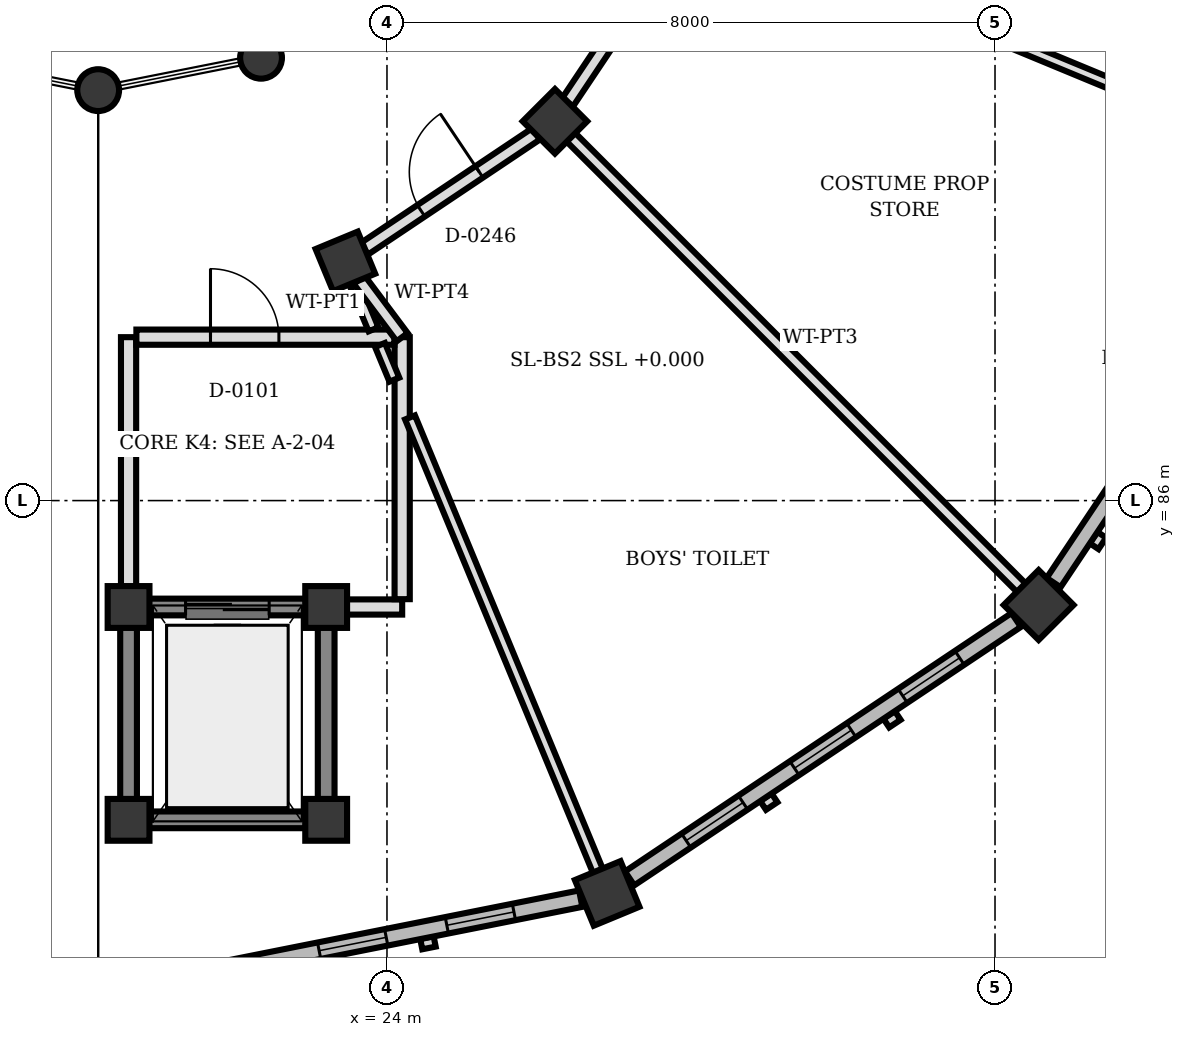
"""IFC4 building model, lengths in metres.
Left out: names, types, materials, properties, quantities, classifications, styles, units other than length and angle.
Written with IfcOpenShell. Run it as: python <this file> out.ifc"""

import sys

from ifc_helpers import new_model, si_unit, direction, frame, frame_2d, origin, origin_2d, place, context, subcontext, project, spatial, rectangle, circle, extrude, element, fill, save


model = new_model("IFC4")
c1 = context("Model", 3, precision=1e-05, world=origin(), true_north=direction((0.0, 1.0)))
c2 = subcontext(c1, "Body", "Model", "MODEL_VIEW")
j1 = project(units=[si_unit("LENGTHUNIT", "METRE"), si_unit("PLANEANGLEUNIT", "RADIAN")], contexts=[c1])
p1 = place(None, origin())
s1 = spatial("IfcSite", under=j1, at=p1, CompositionType="ELEMENT")
p2 = place(p1, origin())
s2 = spatial("IfcBuilding", under=s1, at=p2, CompositionType="ELEMENT")
p3 = place(p2, origin())
s3 = spatial("IfcBuildingStorey", under=s2, at=p3, CompositionType="ELEMENT", Elevation=0.0)
for number, where, z_axis, x_axis in (
    (1, (20.6, 81.8, 0.0), (0.0, 0.0, 1.0), (1.0, 0.0, 0.0)),
    (2, (23.2, 81.8, 0.0), (0.0, 0.0, 1.0), (1.0, 0.0, 0.0)),
    (3, (23.2, 84.6, 0.0), (0.0, 0.0, 1.0), (1.0, 0.0, 0.0)),
    (4, (20.6, 84.6, 0.0), (0.0, 0.0, 1.0), (1.0, 0.0, 0.0)),
):
    element("IfcColumn", number, at=place(p3, frame(where, z_axis=z_axis, x_axis=x_axis)), inside=s3, PredefinedType="COLUMN", context=c2, shape_type="SweptSolid", body=[
        extrude(rectangle(XDim=0.55, YDim=0.55, at=origin_2d()), origin(), (0.0, 0.0, 1.0), 4.5),
    ])
for number, where, z_axis, x_axis in (
    (5, (20.2, 91.4, 0.0), (0.0, 0.0, 1.0), (1.0, 0.0, 0.0)),
    (6, (22.343, 91.826, 0.0), (0.0, 0.0, 1.0), (1.0, 0.0, 0.0)),
):
    element("IfcColumn", number, at=place(p3, frame(where, z_axis=z_axis, x_axis=x_axis)), inside=s3, PredefinedType="COLUMN", context=c2, shape_type="SweptSolid", body=[
        extrude(circle(Radius=0.275, at=origin_2d()), origin(), (0.0, 0.0, 1.0), 4.5),
    ])
for number, where, z_axis, x_axis in (
    (7, (23.453, 89.147, 0.0), (0.0, 0.0, 1.0), (0.383, -0.924, 0.0)),
    (8, (26.21, 90.99, 0.0), (0.0, 0.0, 1.0), (0.707, -0.707, 0.0)),
):
    element("IfcColumn", number, at=place(p3, frame(where, z_axis=z_axis, x_axis=x_axis)), inside=s3, PredefinedType="COLUMN", context=c2, shape_type="SweptSolid", body=[
        extrude(rectangle(XDim=0.6, YDim=0.6, at=origin_2d()), origin(), (0.0, 0.0, 1.0), 4.5),
    ])
for number, where, z_axis, x_axis in (
    (9, (26.897, 80.832, 0.0), (0.0, 0.0, 1.0), (0.383, -0.924, 0.0)),
    (10, (32.574, 84.626, 0.0), (0.0, 0.0, 1.0), (0.707, -0.707, 0.0)),
):
    element("IfcColumn", number, at=place(p3, frame(where, z_axis=z_axis, x_axis=x_axis)), inside=s3, PredefinedType="COLUMN", context=c2, shape_type="SweptSolid", body=[
        extrude(rectangle(XDim=0.65, YDim=0.65, at=origin_2d()), origin(), (0.0, 0.0, 1.0), 4.5),
    ])
p4 = place(p3, frame((19.852, 79.569, 0.0), z_axis=(0.0, 0.0, 1.0), x_axis=(-0.98077967596, 0.19511849534, 0.0)))
e11 = element("IfcWall", 11, at=p4, inside=s3, PredefinedType="SOLIDWALL", context=c2, shape_type="SweptSolid", body=[
    extrude(rectangle(XDim=6.119, YDim=0.22, at=frame_2d((3.059, 0.0))), origin(), (0.0, 0.0, 1.0), 3.55),
])
p5 = place(p4, frame((0.896, 0.0, 0.85)))
e12 = element("IfcOpeningElement", 12, at=p5, cuts=e11, PredefinedType="OPENING", context=c2, shape_type="SweptSolid", body=[
    extrude(rectangle(XDim=0.9, YDim=1.4, at=frame_2d((0.45, 0.7))), frame((0.0, 0.12, 0.0), z_axis=(0.0, -1.0, 0.0), x_axis=(1.0, 0.0, 0.0)), (0.0, 0.0, 1.0), 0.24),
])
p6 = place(p4, frame((2.609, 0.0, 0.85)))
e13 = element("IfcOpeningElement", 13, at=p6, cuts=e11, PredefinedType="OPENING", context=c2, shape_type="SweptSolid", body=[
    extrude(rectangle(XDim=0.9, YDim=1.4, at=frame_2d((0.45, 0.7))), frame((0.0, 0.12, 0.0), z_axis=(0.0, -1.0, 0.0), x_axis=(1.0, 0.0, 0.0)), (0.0, 0.0, 1.0), 0.24),
])
p7 = place(p4, frame((4.323, 0.0, 0.85)))
e14 = element("IfcOpeningElement", 14, at=p7, cuts=e11, PredefinedType="OPENING", context=c2, shape_type="SweptSolid", body=[
    extrude(rectangle(XDim=0.9, YDim=1.4, at=frame_2d((0.45, 0.7))), frame((0.0, 0.12, 0.0), z_axis=(0.0, -1.0, 0.0), x_axis=(1.0, 0.0, 0.0)), (0.0, 0.0, 1.0), 0.24),
])
p8 = place(p3, frame((26.549, 80.763, 0.0), z_axis=(0.0, 0.0, 1.0), x_axis=(-0.98077967596, -0.19511849534, 0.0)))
e15 = element("IfcWall", 15, at=p8, inside=s3, PredefinedType="SOLIDWALL", context=c2, shape_type="SweptSolid", body=[
    extrude(rectangle(XDim=6.119, YDim=0.22, at=frame_2d((3.059, 0.0))), origin(), (0.0, 0.0, 1.0), 3.55),
])
p9 = place(p8, frame((0.896, 0.0, 0.85)))
e16 = element("IfcOpeningElement", 16, at=p9, cuts=e15, PredefinedType="OPENING", context=c2, shape_type="SweptSolid", body=[
    extrude(rectangle(XDim=0.9, YDim=1.4, at=frame_2d((0.45, 0.7))), frame((0.0, 0.12, 0.0), z_axis=(0.0, -1.0, 0.0), x_axis=(1.0, 0.0, 0.0)), (0.0, 0.0, 1.0), 0.24),
])
p10 = place(p8, frame((2.609, 0.0, 0.85)))
e17 = element("IfcOpeningElement", 17, at=p10, cuts=e15, PredefinedType="OPENING", context=c2, shape_type="SweptSolid", body=[
    extrude(rectangle(XDim=0.9, YDim=1.4, at=frame_2d((0.45, 0.7))), frame((0.0, 0.12, 0.0), z_axis=(0.0, -1.0, 0.0), x_axis=(1.0, 0.0, 0.0)), (0.0, 0.0, 1.0), 0.24),
])
p11 = place(p8, frame((4.323, 0.0, 0.85)))
e18 = element("IfcOpeningElement", 18, at=p11, cuts=e15, PredefinedType="OPENING", context=c2, shape_type="SweptSolid", body=[
    extrude(rectangle(XDim=0.9, YDim=1.4, at=frame_2d((0.45, 0.7))), frame((0.0, 0.12, 0.0), z_axis=(0.0, -1.0, 0.0), x_axis=(1.0, 0.0, 0.0)), (0.0, 0.0, 1.0), 0.24),
])
p12 = place(p3, frame((32.279, 84.429, 0.0), z_axis=(0.0, 0.0, 1.0), x_axis=(-0.831411331728, -0.555657446161, 0.0)))
e19 = element("IfcWall", 19, at=p12, inside=s3, PredefinedType="SOLIDWALL", context=c2, shape_type="SweptSolid", body=[
    extrude(rectangle(XDim=6.119, YDim=0.22, at=frame_2d((3.059, 0.0))), origin(), (0.0, 0.0, 1.0), 3.55),
])
p13 = place(p12, frame((0.896, 0.0, 0.85)))
e20 = element("IfcOpeningElement", 20, at=p13, cuts=e19, PredefinedType="OPENING", context=c2, shape_type="SweptSolid", body=[
    extrude(rectangle(XDim=0.9, YDim=1.4, at=frame_2d((0.45, 0.7))), frame((0.0, 0.12, 0.0), z_axis=(0.0, -1.0, 0.0), x_axis=(1.0, 0.0, 0.0)), (0.0, 0.0, 1.0), 0.24),
])
p14 = place(p12, frame((2.609, 0.0, 0.85)))
e21 = element("IfcOpeningElement", 21, at=p14, cuts=e19, PredefinedType="OPENING", context=c2, shape_type="SweptSolid", body=[
    extrude(rectangle(XDim=0.9, YDim=1.4, at=frame_2d((0.45, 0.7))), frame((0.0, 0.12, 0.0), z_axis=(0.0, -1.0, 0.0), x_axis=(1.0, 0.0, 0.0)), (0.0, 0.0, 1.0), 0.24),
])
p15 = place(p12, frame((4.323, 0.0, 0.85)))
e22 = element("IfcOpeningElement", 22, at=p15, cuts=e19, PredefinedType="OPENING", context=c2, shape_type="SweptSolid", body=[
    extrude(rectangle(XDim=0.9, YDim=1.4, at=frame_2d((0.45, 0.7))), frame((0.0, 0.12, 0.0), z_axis=(0.0, -1.0, 0.0), x_axis=(1.0, 0.0, 0.0)), (0.0, 0.0, 1.0), 0.24),
])
p16 = place(p3, frame((36.171, 90.008, 0.0), z_axis=(0.0, 0.0, 1.0), x_axis=(-0.555657446161, -0.831411331728, 0.0)))
e23 = element("IfcWall", 23, at=p16, inside=s3, PredefinedType="SOLIDWALL", context=c2, shape_type="SweptSolid", body=[
    extrude(rectangle(XDim=6.119, YDim=0.22, at=frame_2d((3.059, 0.0))), origin(), (0.0, 0.0, 1.0), 3.55),
])
p17 = place(p16, frame((2.284, 0.0, 0.0)))
e24 = element("IfcOpeningElement", 24, at=p17, cuts=e23, PredefinedType="OPENING", context=c2, shape_type="SweptSolid", body=[
    extrude(rectangle(XDim=1.55, YDim=2.2, at=frame_2d((0.775, 1.1))), frame((0.0, 0.12, 0.0), z_axis=(0.0, -1.0, 0.0), x_axis=(1.0, 0.0, 0.0)), (0.0, 0.0, 1.0), 0.24),
])
p18 = place(p3, frame((20.867, 81.8, 0.0), z_axis=(0.0, 0.0, 1.0), x_axis=(1.0, 0.0, 0.0)))
e25 = element("IfcWall", 25, at=p18, inside=s3, PredefinedType="SHEAR", context=c2, shape_type="SweptSolid", body=[
    extrude(rectangle(XDim=2.066, YDim=0.22, at=frame_2d((1.033, 0.0))), origin(), (0.0, 0.0, 1.0), 4.24),
])
p19 = place(p3, frame((23.2, 82.067, 0.0), z_axis=(0.0, 0.0, 1.0), x_axis=(0.0, 1.0, 0.0)))
e26 = element("IfcWall", 26, at=p19, inside=s3, PredefinedType="SHEAR", context=c2, shape_type="SweptSolid", body=[
    extrude(rectangle(XDim=2.266, YDim=0.22, at=frame_2d((1.133, 0.0))), origin(), (0.0, 0.0, 1.0), 4.24),
])
p20 = place(p3, frame((22.933, 84.6, 0.0), z_axis=(0.0, 0.0, 1.0), x_axis=(-1.0, 0.0, 0.0)))
e27 = element("IfcWall", 27, at=p20, inside=s3, PredefinedType="SHEAR", context=c2, shape_type="SweptSolid", body=[
    extrude(rectangle(XDim=2.066, YDim=0.22, at=frame_2d((1.033, 0.0))), origin(), (0.0, 0.0, 1.0), 4.24),
])
p21 = place(p20, frame((0.483, 0.0, 0.0)))
e28 = element("IfcOpeningElement", 28, at=p21, cuts=e27, PredefinedType="OPENING", context=c2, shape_type="SweptSolid", body=[
    extrude(rectangle(XDim=1.1, YDim=2.15, at=frame_2d((0.55, 1.075))), frame((0.0, 0.12, 0.0), z_axis=(0.0, -1.0, 0.0), x_axis=(1.0, 0.0, 0.0)), (0.0, 0.0, 1.0), 0.24),
])
p22 = place(p3, frame((20.6, 84.333, 0.0), z_axis=(0.0, 0.0, 1.0), x_axis=(0.0, -1.0, 0.0)))
e29 = element("IfcWall", 29, at=p22, inside=s3, PredefinedType="SHEAR", context=c2, shape_type="SweptSolid", body=[
    extrude(rectangle(XDim=2.266, YDim=0.22, at=frame_2d((1.133, 0.0))), origin(), (0.0, 0.0, 1.0), 4.24),
])
p23 = place(p3, frame((23.467, 84.6, 0.0), z_axis=(0.0, 0.0, 1.0), x_axis=(1.0, 0.0, 0.0)))
e30 = element("IfcWall", 30, at=p23, inside=s3, PredefinedType="PARTITIONING", context=c2, shape_type="SweptSolid", body=[
    extrude(rectangle(XDim=0.733, YDim=0.2, at=frame_2d((0.366, 0.0))), origin(), (0.0, 0.0, 1.0), 4.2),
])
p24 = place(p3, frame((20.6, 84.867, 0.0), z_axis=(0.0, 0.0, 1.0), x_axis=(0.0, 1.0, 0.0)))
e31 = element("IfcWall", 31, at=p24, inside=s3, PredefinedType="PARTITIONING", context=c2, shape_type="SweptSolid", body=[
    extrude(rectangle(XDim=3.283, YDim=0.2, at=frame_2d((1.642, 0.0))), origin(), (0.0, 0.0, 1.0), 4.2),
])
p25 = place(p3, frame((24.2, 84.703, 0.0), z_axis=(0.0, 0.0, 1.0), x_axis=(0.0, 1.0, 0.0)))
e32 = element("IfcWall", 32, at=p25, inside=s3, PredefinedType="PARTITIONING", context=c2, shape_type="SweptSolid", body=[
    extrude(rectangle(XDim=3.447, YDim=0.2, at=frame_2d((1.724, 0.0))), origin(), (0.0, 0.0, 1.0), 3.552),
])
p26 = place(p3, frame((20.703, 88.15, 0.0), z_axis=(0.0, 0.0, 1.0), x_axis=(1.0, 0.0, 0.0)))
e33 = element("IfcWall", 33, at=p26, inside=s3, PredefinedType="PARTITIONING", context=c2, shape_type="SweptSolid", body=[
    extrude(rectangle(XDim=3.394, YDim=0.2, at=frame_2d((1.697, 0.0))), origin(), (0.0, 0.0, 1.0), 3.552),
])
p27 = place(p26, frame((0.975, 0.0, 0.0)))
e34 = element("IfcOpeningElement", 34, at=p27, cuts=e33, PredefinedType="OPENING", context=c2, shape_type="SweptSolid", body=[
    extrude(rectangle(XDim=0.9, YDim=2.2, at=frame_2d((0.45, 1.1))), frame((0.0, 0.11, 0.0), z_axis=(0.0, -1.0, 0.0), x_axis=(1.0, 0.0, 0.0)), (0.0, 0.0, 1.0), 0.22),
])
p28 = place(p3, frame((23.564, 88.877, 0.0), z_axis=(0.0, 0.0, 1.0), x_axis=(0.383383487336, -0.923589249417, 0.0)))
e35 = element("IfcWall", 35, at=p28, inside=s3, PredefinedType="PARTITIONING", context=c2, shape_type="SweptSolid", body=[
    extrude(rectangle(XDim=0.676, YDim=0.14, at=frame_2d((0.338, 0.0))), origin(), (0.0, 0.0, 1.0), 3.552),
])
p29 = place(p3, frame((23.908, 88.047, 0.0), z_axis=(0.0, 0.0, 1.0), x_axis=(0.3827885685, -0.92383597669, 0.0)))
e36 = element("IfcWall", 36, at=p29, inside=s3, PredefinedType="PARTITIONING", context=c2, shape_type="SweptSolid", body=[
    extrude(rectangle(XDim=0.494, YDim=0.14, at=frame_2d((0.247, 0.0))), origin(), (0.0, 0.0, 1.0), 3.552),
])
p30 = place(p3, frame((24.303, 87.094, 0.0), z_axis=(0.0, 0.0, 1.0), x_axis=(0.382744474407, -0.923854245707, 0.0)))
e37 = element("IfcWall", 37, at=p30, inside=s3, PredefinedType="PARTITIONING", context=c2, shape_type="SweptSolid", body=[
    extrude(rectangle(XDim=6.461, YDim=0.14, at=frame_2d((3.23, 0.0))), origin(), (0.0, 0.0, 1.0), 3.552),
])
p31 = place(p3, frame((26.416, 90.784, 0.0), z_axis=(0.0, 0.0, 1.0), x_axis=(0.707121327267, -0.707092234807, 0.0)))
e38 = element("IfcWall", 38, at=p31, inside=s3, PredefinedType="PARTITIONING", context=c2, shape_type="SweptSolid", body=[
    extrude(rectangle(XDim=8.392, YDim=0.16, at=frame_2d((4.196, 0.0))), origin(), (0.0, 0.0, 1.0), 3.552),
])
p32 = place(p3, frame((30.396, 92.777, 0.0), z_axis=(0.0, 0.0, 1.0), x_axis=(0.923837705987, -0.382784394923, 0.0)))
e39 = element("IfcWall", 39, at=p32, inside=s3, PredefinedType="PARTITIONING", context=c2, shape_type="SweptSolid", body=[
    extrude(rectangle(XDim=6.147, YDim=0.14, at=frame_2d((3.074, 0.0))), origin(), (0.0, 0.0, 1.0), 3.552),
])
p33 = place(p3, frame((23.701, 89.312, 0.0), z_axis=(0.0, 0.0, 1.0), x_axis=(0.831096426298, 0.556128339679, 0.0)))
e40 = element("IfcWall", 40, at=p33, inside=s3, PredefinedType="PARTITIONING", context=c2, shape_type="SweptSolid", body=[
    extrude(rectangle(XDim=2.72, YDim=0.18, at=frame_2d((1.36, 0.0))), origin(), (0.0, 0.0, 1.0), 3.552),
])
p34 = place(p33, frame((0.9, 0.0, 0.0)))
e41 = element("IfcOpeningElement", 41, at=p34, cuts=e40, PredefinedType="OPENING", context=c2, shape_type="SweptSolid", body=[
    extrude(rectangle(XDim=0.92, YDim=2.1, at=frame_2d((0.46, 1.05))), frame((0.0, 0.1, 0.0), z_axis=(0.0, -1.0, 0.0), x_axis=(1.0, 0.0, 0.0)), (0.0, 0.0, 1.0), 0.2),
])
p35 = place(p3, frame((26.375, 91.238, 0.0), z_axis=(0.0, 0.0, 1.0), x_axis=(0.556128339679, 0.831096426298, 0.0)))
e42 = element("IfcWall", 42, at=p35, inside=s3, PredefinedType="PARTITIONING", context=c2, shape_type="SweptSolid", body=[
    extrude(rectangle(XDim=2.72, YDim=0.18, at=frame_2d((1.36, 0.0))), origin(), (0.0, 0.0, 1.0), 3.552),
])
p36 = place(p35, frame((0.9, 0.0, 0.0)))
e43 = element("IfcOpeningElement", 43, at=p36, cuts=e42, PredefinedType="OPENING", context=c2, shape_type="SweptSolid", body=[
    extrude(rectangle(XDim=0.92, YDim=2.1, at=frame_2d((0.46, 1.05))), frame((0.0, 0.1, 0.0), z_axis=(0.0, -1.0, 0.0), x_axis=(1.0, 0.0, 0.0)), (0.0, 0.0, 1.0), 0.2),
])
p37 = place(p3, frame((24.2, 88.15, 0.0), z_axis=(0.0, 0.0, 1.0), x_axis=(-0.599213856278, 0.800589004699, 0.0)))
e44 = element("IfcWall", 44, at=p37, inside=s3, PredefinedType="PARTITIONING", context=c2, shape_type="SweptSolid", body=[
    extrude(rectangle(XDim=0.944, YDim=0.18, at=frame_2d((0.472, 0.0))), origin(), (0.0, 0.0, 1.0), 3.552),
])
p38 = place(p9, origin())
e45 = element("IfcWindow", 45, at=p38, inside=s3, PartitioningType="SINGLE_PANEL", PredefinedType="WINDOW", context=c2, shape_type="SweptSolid", body=[
    extrude(rectangle(XDim=0.9, YDim=1.4, at=frame_2d((0.45, 0.7))), frame((0.0, 0.03, 0.0), z_axis=(0.0, -1.0, 0.0), x_axis=(1.0, 0.0, 0.0)), (0.0, 0.0, 1.0), 0.06),
])
fill(e16, e45)
p39 = place(p10, origin())
e46 = element("IfcWindow", 46, at=p39, inside=s3, PartitioningType="SINGLE_PANEL", PredefinedType="WINDOW", context=c2, shape_type="SweptSolid", body=[
    extrude(rectangle(XDim=0.9, YDim=1.4, at=frame_2d((0.45, 0.7))), frame((0.0, 0.03, 0.0), z_axis=(0.0, -1.0, 0.0), x_axis=(1.0, 0.0, 0.0)), (0.0, 0.0, 1.0), 0.06),
])
fill(e17, e46)
p40 = place(p13, origin())
e47 = element("IfcWindow", 47, at=p40, inside=s3, PartitioningType="SINGLE_PANEL", PredefinedType="WINDOW", context=c2, shape_type="SweptSolid", body=[
    extrude(rectangle(XDim=0.9, YDim=1.4, at=frame_2d((0.45, 0.7))), frame((0.0, 0.03, 0.0), z_axis=(0.0, -1.0, 0.0), x_axis=(1.0, 0.0, 0.0)), (0.0, 0.0, 1.0), 0.06),
])
fill(e20, e47)
p41 = place(p14, origin())
e48 = element("IfcWindow", 48, at=p41, inside=s3, PartitioningType="SINGLE_PANEL", PredefinedType="WINDOW", context=c2, shape_type="SweptSolid", body=[
    extrude(rectangle(XDim=0.9, YDim=1.4, at=frame_2d((0.45, 0.7))), frame((0.0, 0.03, 0.0), z_axis=(0.0, -1.0, 0.0), x_axis=(1.0, 0.0, 0.0)), (0.0, 0.0, 1.0), 0.06),
])
fill(e21, e48)
p42 = place(p15, origin())
e49 = element("IfcWindow", 49, at=p42, inside=s3, PartitioningType="SINGLE_PANEL", PredefinedType="WINDOW", context=c2, shape_type="SweptSolid", body=[
    extrude(rectangle(XDim=0.9, YDim=1.4, at=frame_2d((0.45, 0.7))), frame((0.0, 0.03, 0.0), z_axis=(0.0, -1.0, 0.0), x_axis=(1.0, 0.0, 0.0)), (0.0, 0.0, 1.0), 0.06),
])
fill(e22, e49)
p43 = place(p21, origin())
e50 = element("IfcDoor", 50, at=p43, inside=s3, OperationType="DOUBLE_DOOR_SLIDING", PredefinedType="DOOR", context=c2, shape_type="SweptSolid", body=[
    extrude(rectangle(XDim=1.1, YDim=2.15, at=frame_2d((0.55, 1.075))), frame((0.0, 0.025, 0.0), z_axis=(0.0, -1.0, 0.0), x_axis=(1.0, 0.0, 0.0)), (0.0, 0.0, 1.0), 0.05),
])
fill(e28, e50)
p44 = place(p27, origin())
e51 = element("IfcDoor", 51, at=p44, inside=s3, OperationType="SINGLE_SWING_LEFT", PredefinedType="DOOR", context=c2, shape_type="SweptSolid", body=[
    extrude(rectangle(XDim=0.9, YDim=2.2, at=frame_2d((0.45, 1.1))), frame((0.0, 0.025, 0.0), z_axis=(0.0, -1.0, 0.0), x_axis=(1.0, 0.0, 0.0)), (0.0, 0.0, 1.0), 0.05),
])
fill(e34, e51)
p45 = place(p34, origin())
e52 = element("IfcDoor", 52, at=p45, inside=s3, OperationType="SINGLE_SWING_RIGHT", PredefinedType="DOOR", context=c2, shape_type="SweptSolid", body=[
    extrude(rectangle(XDim=0.92, YDim=2.1, at=frame_2d((0.46, 1.05))), frame((0.0, 0.025, 0.0), z_axis=(0.0, -1.0, 0.0), x_axis=(1.0, 0.0, 0.0)), (0.0, 0.0, 1.0), 0.05),
])
fill(e41, e52)
save(model, sys.argv[1])
